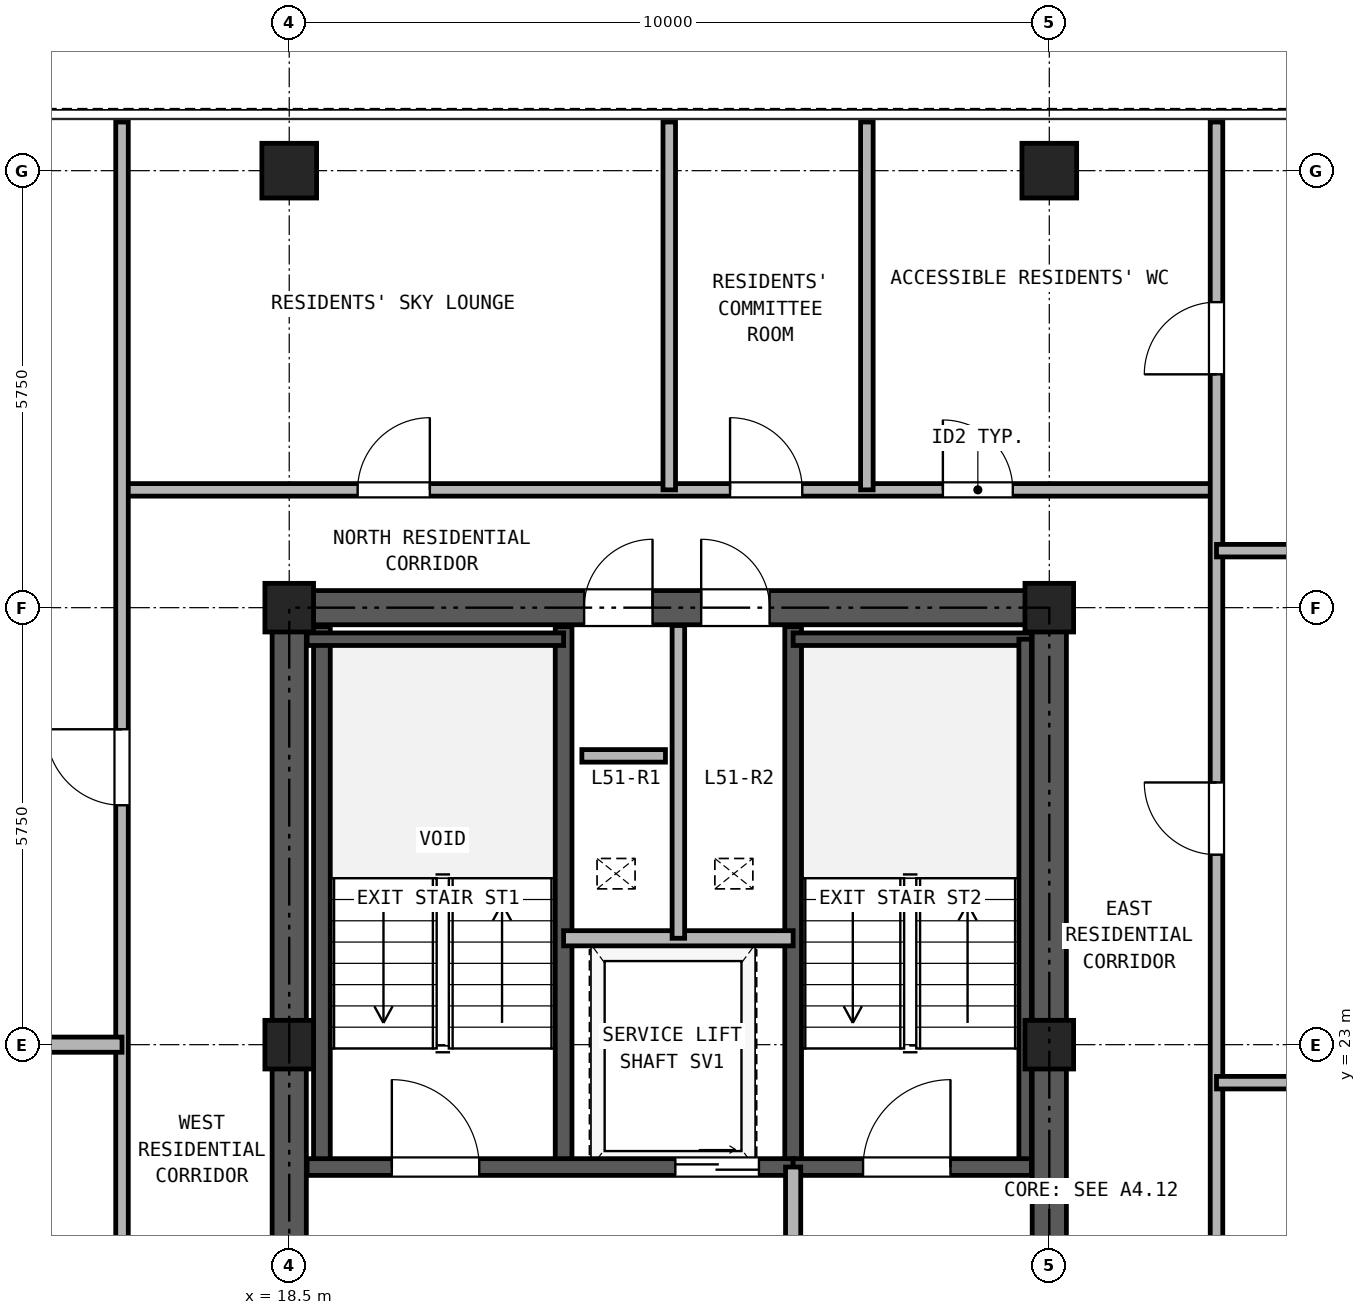
"""IFC4 building model, lengths in metres.
Left out: names, types, materials, properties, quantities, classifications, styles, units other than length and angle.
Written with IfcOpenShell. Run it as: python <this file> out.ifc"""

import sys

from ifc_helpers import new_model, si_unit, direction, frame, frame_2d, origin, origin_2d, place, context, subcontext, project, spatial, rectangle, hollow_rectangle, extrude, source, transform, mapped, element, fill, save


model = new_model("IFC4")
c1 = context("Model", 3, precision=1e-05, world=origin(), true_north=direction((0.0, 1.0)))
c2 = subcontext(c1, "Body", "Model", "MODEL_VIEW")
j1 = project(units=[si_unit("LENGTHUNIT", "METRE"), si_unit("PLANEANGLEUNIT", "RADIAN")], contexts=[c1])
p1 = place(None, origin())
s1 = spatial("IfcSite", under=j1, at=p1, CompositionType="ELEMENT")
p2 = place(p1, origin())
s2 = spatial("IfcBuilding", under=s1, at=p2, CompositionType="ELEMENT")
p3 = place(p2, frame((0.0, 0.0, 181.7)))
s3 = spatial("IfcBuildingStorey", under=s2, at=p3, CompositionType="ELEMENT", Elevation=181.7)
m1 = source(origin(), c2, "Body", "SweptSolid", [
    extrude(hollow_rectangle(XDim=0.72, YDim=0.72, WallThickness=0.04, at=origin_2d()), origin(), (0.0, 0.0, 1.0), 2.95),
])
for number, where, z_axis, x_axis in (
    (1, (18.5, 34.5, 0.0), (0.0, 0.0, 1.0), (1.0, 0.0, 0.0)),
    (2, (28.5, 34.5, 0.0), (0.0, 0.0, 1.0), (1.0, 0.0, 0.0)),
):
    element("IfcColumn", number, at=place(p3, frame(where, z_axis=z_axis, x_axis=x_axis)), inside=s3, PredefinedType="COLUMN", context=c2, shape_type="MappedRepresentation", body=[
        mapped(m1, transform((0.0, 0.0, 0.0), x_axis=(1.0, 0.0, 0.0), y_axis=(0.0, 1.0, 0.0), z_axis=(0.0, 0.0, 1.0), scale=1.0)),
    ])
m2 = source(origin(), c2, "Body", "SweptSolid", [
    extrude(hollow_rectangle(XDim=0.64, YDim=0.64, WallThickness=0.035, at=origin_2d()), origin(), (0.0, 0.0, 1.0), 2.95),
])
for number, where, z_axis, x_axis in (
    (3, (18.5, 23.0, 0.0), (0.0, 0.0, 1.0), (1.0, 0.0, 0.0)),
    (4, (18.5, 28.75, 0.0), (0.0, 0.0, 1.0), (1.0, 0.0, 0.0)),
    (5, (28.5, 23.0, 0.0), (0.0, 0.0, 1.0), (1.0, 0.0, 0.0)),
    (6, (28.5, 28.75, 0.0), (0.0, 0.0, 1.0), (1.0, 0.0, 0.0)),
):
    element("IfcColumn", number, at=place(p3, frame(where, z_axis=z_axis, x_axis=x_axis)), inside=s3, PredefinedType="COLUMN", context=c2, shape_type="MappedRepresentation", body=[
        mapped(m2, transform((0.0, 0.0, 0.0), x_axis=(1.0, 0.0, 0.0), y_axis=(0.0, 1.0, 0.0), z_axis=(0.0, 0.0, 1.0), scale=1.0)),
    ])
p4 = place(p3, frame((18.275, 28.75, 0.0), z_axis=(0.0, 0.0, 1.0), x_axis=(1.0, 0.0, 0.0)))
e7 = element("IfcWall", 7, at=p4, inside=s3, PredefinedType="SHEAR", context=c2, shape_type="SweptSolid", body=[
    extrude(rectangle(XDim=10.45, YDim=0.45, at=frame_2d((5.225, 0.0))), origin(), (0.0, 0.0, 1.0), 2.95),
])
p5 = place(p4, frame((4.105, 0.0, 0.0)))
e8 = element("IfcOpeningElement", 8, at=p5, cuts=e7, PredefinedType="OPENING", context=c2, shape_type="SweptSolid", body=[
    extrude(rectangle(XDim=0.9, YDim=2.05, at=frame_2d((0.45, 1.025))), frame((0.0, 0.235, 0.0), z_axis=(0.0, -1.0, 0.0), x_axis=(1.0, 0.0, 0.0)), (0.0, 0.0, 1.0), 0.47),
])
p6 = place(p4, frame((5.645, 0.0, 0.0)))
e9 = element("IfcOpeningElement", 9, at=p6, cuts=e7, PredefinedType="OPENING", context=c2, shape_type="SweptSolid", body=[
    extrude(rectangle(XDim=0.9, YDim=2.05, at=frame_2d((0.45, 1.025))), frame((0.0, 0.235, 0.0), z_axis=(0.0, -1.0, 0.0), x_axis=(1.0, 0.0, 0.0)), (0.0, 0.0, 1.0), 0.47),
])
p7 = place(p3, frame((18.5, 11.725, 0.0), z_axis=(0.0, 0.0, 1.0), x_axis=(0.0, 1.0, 0.0)))
e10 = element("IfcWall", 10, at=p7, inside=s3, PredefinedType="SHEAR", context=c2, shape_type="SweptSolid", body=[
    extrude(rectangle(XDim=16.8, YDim=0.45, at=frame_2d((8.4, 0.0))), origin(), (0.0, 0.0, 1.0), 2.95),
])
p8 = place(p7, frame((7.425, 0.0, 0.0)))
e11 = element("IfcOpeningElement", 11, at=p8, cuts=e10, PredefinedType="OPENING", context=c2, shape_type="SweptSolid", body=[
    extrude(rectangle(XDim=1.15, YDim=2.2, at=frame_2d((0.575, 1.1))), frame((0.0, 0.235, 0.0), z_axis=(0.0, -1.0, 0.0), x_axis=(1.0, 0.0, 0.0)), (0.0, 0.0, 1.0), 0.47),
])
p9 = place(p3, frame((28.5, 11.725, 0.0), z_axis=(0.0, 0.0, 1.0), x_axis=(0.0, 1.0, 0.0)))
e12 = element("IfcWall", 12, at=p9, inside=s3, PredefinedType="SHEAR", context=c2, shape_type="SweptSolid", body=[
    extrude(rectangle(XDim=16.8, YDim=0.45, at=frame_2d((8.4, 0.0))), origin(), (0.0, 0.0, 1.0), 2.95),
])
p10 = place(p9, frame((7.425, 0.0, 0.0)))
e13 = element("IfcOpeningElement", 13, at=p10, cuts=e12, PredefinedType="OPENING", context=c2, shape_type="SweptSolid", body=[
    extrude(rectangle(XDim=1.15, YDim=2.2, at=frame_2d((0.575, 1.1))), frame((0.0, 0.235, 0.0), z_axis=(0.0, -1.0, 0.0), x_axis=(1.0, 0.0, 0.0)), (0.0, 0.0, 1.0), 0.47),
])
for number, where, z_axis, x_axis in (
    (14, (18.93, 21.39, 0.0), (0.0, 0.0, 1.0), (0.0, 1.0, 0.0)),
    (15, (22.11, 21.39, 0.0), (0.0, 0.0, 1.0), (0.0, 1.0, 0.0)),
    (16, (25.13, 21.39, 0.0), (0.0, 0.0, 1.0), (0.0, 1.0, 0.0)),
):
    element("IfcWall", number, at=place(p3, frame(where, z_axis=z_axis, x_axis=x_axis)), inside=s3, PredefinedType="SOLIDWALL", context=c2, shape_type="SweptSolid", body=[
        extrude(rectangle(XDim=7.11, YDim=0.22, at=frame_2d((3.555, 0.0))), origin(), (0.0, 0.0, 1.0), 2.95),
    ])
p11 = place(p3, frame((18.735, 28.335, 0.0), z_axis=(0.0, 0.0, 1.0), x_axis=(1.0, 0.0, 0.0)))
e17 = element("IfcWall", 17, at=p11, inside=s3, PredefinedType="PARTITIONING", context=c2, shape_type="SweptSolid", body=[
    extrude(rectangle(XDim=3.375, YDim=0.165, at=frame_2d((1.688, 0.0))), origin(), (0.0, 0.0, 1.0), 2.95),
])
p12 = place(p3, frame((25.13, 28.335, 0.0), z_axis=(0.0, 0.0, 1.0), x_axis=(1.0, 0.0, 0.0)))
e18 = element("IfcWall", 18, at=p12, inside=s3, PredefinedType="PARTITIONING", context=c2, shape_type="SweptSolid", body=[
    extrude(rectangle(XDim=3.135, YDim=0.165, at=frame_2d((1.567, 0.0))), origin(), (0.0, 0.0, 1.0), 2.95),
])
p13 = place(p3, frame((28.183, 21.39, 0.0), z_axis=(0.0, 0.0, 1.0), x_axis=(0.0, 1.0, 0.0)))
e19 = element("IfcWall", 19, at=p13, inside=s3, PredefinedType="PARTITIONING", context=c2, shape_type="SweptSolid", body=[
    extrude(rectangle(XDim=6.945, YDim=0.165, at=frame_2d((3.473, 0.0))), origin(), (0.0, 0.0, 1.0), 2.95),
])
p14 = place(p3, frame((18.735, 21.39, 0.0), z_axis=(0.0, 0.0, 1.0), x_axis=(1.0, 0.0, 0.0)))
e20 = element("IfcWall", 20, at=p14, inside=s3, PredefinedType="SOLIDWALL", context=c2, shape_type="SweptSolid", body=[
    extrude(rectangle(XDim=6.395, YDim=0.22, at=frame_2d((3.197, 0.0))), origin(), (0.0, 0.0, 1.0), 2.95),
])
p15 = place(p14, frame((1.115, 0.0, 0.0)))
e21 = element("IfcOpeningElement", 21, at=p15, cuts=e20, PredefinedType="OPENING", context=c2, shape_type="SweptSolid", body=[
    extrude(rectangle(XDim=1.15, YDim=2.2, at=frame_2d((0.575, 1.1))), frame((0.0, 0.12, 0.0), z_axis=(0.0, -1.0, 0.0), x_axis=(1.0, 0.0, 0.0)), (0.0, 0.0, 1.0), 0.24),
])
p16 = place(p14, frame((4.845, 0.0, 0.0)))
e22 = element("IfcOpeningElement", 22, at=p16, cuts=e20, PredefinedType="OPENING", context=c2, shape_type="SweptSolid", body=[
    extrude(rectangle(XDim=1.1, YDim=2.25, at=frame_2d((0.55, 1.125))), frame((0.0, 0.12, 0.0), z_axis=(0.0, -1.0, 0.0), x_axis=(1.0, 0.0, 0.0)), (0.0, 0.0, 1.0), 0.24),
])
p17 = place(p3, frame((25.13, 21.39, 0.0), z_axis=(0.0, 0.0, 1.0), x_axis=(1.0, 0.0, 0.0)))
e23 = element("IfcWall", 23, at=p17, inside=s3, PredefinedType="SOLIDWALL", context=c2, shape_type="SweptSolid", body=[
    extrude(rectangle(XDim=3.135, YDim=0.22, at=frame_2d((1.567, 0.0))), origin(), (0.0, 0.0, 1.0), 2.95),
])
p18 = place(p17, frame((0.92, 0.0, 0.0)))
e24 = element("IfcOpeningElement", 24, at=p18, cuts=e23, PredefinedType="OPENING", context=c2, shape_type="SweptSolid", body=[
    extrude(rectangle(XDim=1.15, YDim=2.2, at=frame_2d((0.575, 1.1))), frame((0.0, 0.12, 0.0), z_axis=(0.0, -1.0, 0.0), x_axis=(1.0, 0.0, 0.0)), (0.0, 0.0, 1.0), 0.24),
])
p19 = place(p3, frame((22.11, 24.4, 0.0), z_axis=(0.0, 0.0, 1.0), x_axis=(1.0, 0.0, 0.0)))
e25 = element("IfcWall", 25, at=p19, inside=s3, PredefinedType="PARTITIONING", context=c2, shape_type="SweptSolid", body=[
    extrude(rectangle(XDim=3.02, YDim=0.2, at=frame_2d((1.51, 0.0))), origin(), (0.0, 0.0, 1.0), 2.95),
])
p20 = place(p3, frame((23.62, 24.4, 0.0), z_axis=(0.0, 0.0, 1.0), x_axis=(0.0, 1.0, 0.0)))
e26 = element("IfcWall", 26, at=p20, inside=s3, PredefinedType="PARTITIONING", context=c2, shape_type="SweptSolid", body=[
    extrude(rectangle(XDim=4.115, YDim=0.165, at=frame_2d((2.058, 0.0))), origin(), (0.0, 0.0, 1.0), 2.95),
])
p21 = place(p3, frame((25.13, 18.0, 0.0), z_axis=(0.0, 0.0, 1.0), x_axis=(0.0, 1.0, 0.0)))
e27 = element("IfcWall", 27, at=p21, inside=s3, PredefinedType="PARTITIONING", context=c2, shape_type="SweptSolid", body=[
    extrude(rectangle(XDim=3.39, YDim=0.2, at=frame_2d((1.695, 0.0))), origin(), (0.0, 0.0, 1.0), 2.95),
])
p22 = place(p21, frame((1.1, 0.0, 0.0)))
e28 = element("IfcOpeningElement", 28, at=p22, cuts=e27, PredefinedType="OPENING", context=c2, shape_type="SweptSolid", body=[
    extrude(rectangle(XDim=1.15, YDim=2.2, at=frame_2d((0.575, 1.1))), frame((0.0, 0.11, 0.0), z_axis=(0.0, -1.0, 0.0), x_axis=(1.0, 0.0, 0.0)), (0.0, 0.0, 1.0), 0.22),
])
p23 = place(p3, frame((16.3, 30.3, 0.0), z_axis=(0.0, 0.0, 1.0), x_axis=(1.0, 0.0, 0.0)))
e29 = element("IfcWall", 29, at=p23, inside=s3, PredefinedType="PARTITIONING", context=c2, shape_type="SweptSolid", body=[
    extrude(rectangle(XDim=14.4, YDim=0.165, at=frame_2d((7.2, 0.0))), origin(), (0.0, 0.0, 1.0), 2.95),
])
p24 = place(p23, frame((3.1, 0.0, 0.0)))
e30 = element("IfcOpeningElement", 30, at=p24, cuts=e29, PredefinedType="OPENING", context=c2, shape_type="SweptSolid", body=[
    extrude(rectangle(XDim=0.95, YDim=2.15, at=frame_2d((0.475, 1.075))), frame((0.0, 0.093, 0.0), z_axis=(0.0, -1.0, 0.0), x_axis=(1.0, 0.0, 0.0)), (0.0, 0.0, 1.0), 0.185),
])
p25 = place(p23, frame((8.0, 0.0, 0.0)))
e31 = element("IfcOpeningElement", 31, at=p25, cuts=e29, PredefinedType="OPENING", context=c2, shape_type="SweptSolid", body=[
    extrude(rectangle(XDim=0.95, YDim=2.15, at=frame_2d((0.475, 1.075))), frame((0.0, 0.093, 0.0), z_axis=(0.0, -1.0, 0.0), x_axis=(1.0, 0.0, 0.0)), (0.0, 0.0, 1.0), 0.185),
])
p26 = place(p23, frame((10.8, 0.0, 0.0)))
e32 = element("IfcOpeningElement", 32, at=p26, cuts=e29, PredefinedType="OPENING", context=c2, shape_type="SweptSolid", body=[
    extrude(rectangle(XDim=0.92, YDim=2.1, at=frame_2d((0.46, 1.05))), frame((0.0, 0.093, 0.0), z_axis=(0.0, -1.0, 0.0), x_axis=(1.0, 0.0, 0.0)), (0.0, 0.0, 1.0), 0.185),
])
p27 = place(p3, frame((16.3, 11.2, 0.0), z_axis=(0.0, 0.0, 1.0), x_axis=(0.0, 1.0, 0.0)))
e33 = element("IfcWall", 33, at=p27, inside=s3, PredefinedType="PARTITIONING", context=c2, shape_type="SweptSolid", body=[
    extrude(rectangle(XDim=23.94, YDim=0.165, at=frame_2d((11.97, 0.0))), origin(), (0.0, 0.0, 1.0), 2.95),
])
p28 = place(p27, frame((5.4, 0.0, 0.0)))
e34 = element("IfcOpeningElement", 34, at=p28, cuts=e33, PredefinedType="OPENING", context=c2, shape_type="SweptSolid", body=[
    extrude(rectangle(XDim=1.0, YDim=2.15, at=frame_2d((0.5, 1.075))), frame((0.0, 0.093, 0.0), z_axis=(0.0, -1.0, 0.0), x_axis=(1.0, 0.0, 0.0)), (0.0, 0.0, 1.0), 0.185),
])
p29 = place(p27, frame((14.95, 0.0, 0.0)))
e35 = element("IfcOpeningElement", 35, at=p29, cuts=e33, PredefinedType="OPENING", context=c2, shape_type="SweptSolid", body=[
    extrude(rectangle(XDim=1.0, YDim=2.15, at=frame_2d((0.5, 1.075))), frame((0.0, 0.093, 0.0), z_axis=(0.0, -1.0, 0.0), x_axis=(1.0, 0.0, 0.0)), (0.0, 0.0, 1.0), 0.185),
])
p30 = place(p3, frame((30.7, 11.2, 0.0), z_axis=(0.0, 0.0, 1.0), x_axis=(0.0, 1.0, 0.0)))
e36 = element("IfcWall", 36, at=p30, inside=s3, PredefinedType="PARTITIONING", context=c2, shape_type="SweptSolid", body=[
    extrude(rectangle(XDim=23.94, YDim=0.165, at=frame_2d((11.97, 0.0))), origin(), (0.0, 0.0, 1.0), 2.95),
])
p31 = place(p30, frame((5.15, 0.0, 0.0)))
e37 = element("IfcOpeningElement", 37, at=p31, cuts=e36, PredefinedType="OPENING", context=c2, shape_type="SweptSolid", body=[
    extrude(rectangle(XDim=0.95, YDim=2.15, at=frame_2d((0.475, 1.075))), frame((0.0, 0.093, 0.0), z_axis=(0.0, -1.0, 0.0), x_axis=(1.0, 0.0, 0.0)), (0.0, 0.0, 1.0), 0.185),
])
p32 = place(p30, frame((14.3, 0.0, 0.0)))
e38 = element("IfcOpeningElement", 38, at=p32, cuts=e36, PredefinedType="OPENING", context=c2, shape_type="SweptSolid", body=[
    extrude(rectangle(XDim=0.95, YDim=2.15, at=frame_2d((0.475, 1.075))), frame((0.0, 0.093, 0.0), z_axis=(0.0, -1.0, 0.0), x_axis=(1.0, 0.0, 0.0)), (0.0, 0.0, 1.0), 0.185),
])
p33 = place(p30, frame((20.62, 0.0, 0.0)))
e39 = element("IfcOpeningElement", 39, at=p33, cuts=e36, PredefinedType="OPENING", context=c2, shape_type="SweptSolid", body=[
    extrude(rectangle(XDim=0.95, YDim=2.15, at=frame_2d((0.475, 1.075))), frame((0.0, 0.093, 0.0), z_axis=(0.0, -1.0, 0.0), x_axis=(1.0, 0.0, 0.0)), (0.0, 0.0, 1.0), 0.185),
])
p34 = place(p3, frame((0.16, 23.0, 0.0), z_axis=(0.0, 0.0, 1.0), x_axis=(1.0, 0.0, 0.0)))
e40 = element("IfcWall", 40, at=p34, inside=s3, PredefinedType="PARTITIONING", context=c2, shape_type="SweptSolid", body=[
    extrude(rectangle(XDim=16.14, YDim=0.2, at=frame_2d((8.07, 0.0))), origin(), (0.0, 0.0, 1.0), 2.323),
])
for number, where, z_axis, x_axis in (
    (41, (30.7, 22.5, 0.0), (0.0, 0.0, 1.0), (1.0, 0.0, 0.0)),
    (42, (30.7, 29.5, 0.0), (0.0, 0.0, 1.0), (1.0, 0.0, 0.0)),
):
    element("IfcWall", number, at=place(p3, frame(where, z_axis=z_axis, x_axis=x_axis)), inside=s3, PredefinedType="PARTITIONING", context=c2, shape_type="SweptSolid", body=[
        extrude(rectangle(XDim=10.94, YDim=0.165, at=frame_2d((5.47, 0.0))), origin(), (0.0, 0.0, 1.0), 2.95),
    ])
for number, where, z_axis, x_axis in (
    (43, (23.5, 30.3, 0.0), (0.0, 0.0, 1.0), (0.0, 1.0, 0.0)),
    (44, (26.1, 30.3, 0.0), (0.0, 0.0, 1.0), (0.0, 1.0, 0.0)),
):
    element("IfcWall", number, at=place(p3, frame(where, z_axis=z_axis, x_axis=x_axis)), inside=s3, PredefinedType="PARTITIONING", context=c2, shape_type="SweptSolid", body=[
        extrude(rectangle(XDim=4.84, YDim=0.165, at=frame_2d((2.42, 0.0))), origin(), (0.0, 0.0, 1.0), 2.95),
    ])
p35 = place(p3, frame((22.35, 26.8, 0.0), z_axis=(0.0, 0.0, 1.0), x_axis=(1.0, 0.0, 0.0)))
e45 = element("IfcWall", 45, at=p35, inside=s3, PredefinedType="PARTITIONING", context=c2, shape_type="SweptSolid", body=[
    extrude(rectangle(XDim=1.1, YDim=0.165, at=frame_2d((0.55, 0.0))), origin(), (0.0, 0.0, 1.0), 2.95),
])
p36 = place(p15, frame((1.15, 0.0, 0.0), z_axis=(0.0, 0.0, 1.0), x_axis=(-1.0, 0.0, 0.0)))
e46 = element("IfcDoor", 46, at=p36, inside=s3, OperationType="SINGLE_SWING_LEFT", PredefinedType="DOOR", context=c2, shape_type="SweptSolid", body=[
    extrude(rectangle(XDim=1.15, YDim=2.2, at=frame_2d((0.575, 1.1))), frame((0.0, 0.025, 0.0), z_axis=(0.0, -1.0, 0.0), x_axis=(1.0, 0.0, 0.0)), (0.0, 0.0, 1.0), 0.05),
])
fill(e21, e46)
p37 = place(p18, frame((1.15, 0.0, 0.0), z_axis=(0.0, 0.0, 1.0), x_axis=(-1.0, 0.0, 0.0)))
e47 = element("IfcDoor", 47, at=p37, inside=s3, OperationType="SINGLE_SWING_RIGHT", PredefinedType="DOOR", context=c2, shape_type="SweptSolid", body=[
    extrude(rectangle(XDim=1.15, YDim=2.2, at=frame_2d((0.575, 1.1))), frame((0.0, 0.025, 0.0), z_axis=(0.0, -1.0, 0.0), x_axis=(1.0, 0.0, 0.0)), (0.0, 0.0, 1.0), 0.05),
])
fill(e24, e47)
p38 = place(p16, frame((1.1, 0.0, 0.0), z_axis=(0.0, 0.0, 1.0), x_axis=(-1.0, 0.0, 0.0)))
e48 = element("IfcDoor", 48, at=p38, inside=s3, OperationType="DOUBLE_DOOR_SLIDING", PredefinedType="DOOR", context=c2, shape_type="SweptSolid", body=[
    extrude(rectangle(XDim=1.1, YDim=2.25, at=frame_2d((0.55, 1.125))), frame((0.0, 0.025, 0.0), z_axis=(0.0, -1.0, 0.0), x_axis=(1.0, 0.0, 0.0)), (0.0, 0.0, 1.0), 0.05),
])
fill(e22, e48)
p39 = place(p5, origin())
e49 = element("IfcDoor", 49, at=p39, inside=s3, OperationType="SINGLE_SWING_RIGHT", PredefinedType="DOOR", context=c2, shape_type="SweptSolid", body=[
    extrude(rectangle(XDim=0.9, YDim=2.05, at=frame_2d((0.45, 1.025))), frame((0.0, 0.025, 0.0), z_axis=(0.0, -1.0, 0.0), x_axis=(1.0, 0.0, 0.0)), (0.0, 0.0, 1.0), 0.05),
])
fill(e8, e49)
p40 = place(p6, origin())
e50 = element("IfcDoor", 50, at=p40, inside=s3, OperationType="SINGLE_SWING_LEFT", PredefinedType="DOOR", context=c2, shape_type="SweptSolid", body=[
    extrude(rectangle(XDim=0.9, YDim=2.05, at=frame_2d((0.45, 1.025))), frame((0.0, 0.025, 0.0), z_axis=(0.0, -1.0, 0.0), x_axis=(1.0, 0.0, 0.0)), (0.0, 0.0, 1.0), 0.05),
])
fill(e9, e50)
p41 = place(p29, origin())
e51 = element("IfcDoor", 51, at=p41, inside=s3, OperationType="SINGLE_SWING_RIGHT", PredefinedType="DOOR", context=c2, shape_type="SweptSolid", body=[
    extrude(rectangle(XDim=1.0, YDim=2.15, at=frame_2d((0.5, 1.075))), frame((0.0, 0.025, 0.0), z_axis=(0.0, -1.0, 0.0), x_axis=(1.0, 0.0, 0.0)), (0.0, 0.0, 1.0), 0.05),
])
fill(e35, e51)
p42 = place(p32, origin())
e52 = element("IfcDoor", 52, at=p42, inside=s3, OperationType="SINGLE_SWING_RIGHT", PredefinedType="DOOR", context=c2, shape_type="SweptSolid", body=[
    extrude(rectangle(XDim=0.95, YDim=2.15, at=frame_2d((0.475, 1.075))), frame((0.0, 0.025, 0.0), z_axis=(0.0, -1.0, 0.0), x_axis=(1.0, 0.0, 0.0)), (0.0, 0.0, 1.0), 0.05),
])
fill(e38, e52)
p43 = place(p33, origin())
e53 = element("IfcDoor", 53, at=p43, inside=s3, OperationType="SINGLE_SWING_LEFT", PredefinedType="DOOR", context=c2, shape_type="SweptSolid", body=[
    extrude(rectangle(XDim=0.95, YDim=2.15, at=frame_2d((0.475, 1.075))), frame((0.0, 0.025, 0.0), z_axis=(0.0, -1.0, 0.0), x_axis=(1.0, 0.0, 0.0)), (0.0, 0.0, 1.0), 0.05),
])
fill(e39, e53)
p44 = place(p24, origin())
e54 = element("IfcDoor", 54, at=p44, inside=s3, OperationType="SINGLE_SWING_RIGHT", PredefinedType="DOOR", context=c2, shape_type="SweptSolid", body=[
    extrude(rectangle(XDim=0.95, YDim=2.15, at=frame_2d((0.475, 1.075))), frame((0.0, 0.025, 0.0), z_axis=(0.0, -1.0, 0.0), x_axis=(1.0, 0.0, 0.0)), (0.0, 0.0, 1.0), 0.05),
])
fill(e30, e54)
p45 = place(p25, origin())
e55 = element("IfcDoor", 55, at=p45, inside=s3, OperationType="SINGLE_SWING_LEFT", PredefinedType="DOOR", context=c2, shape_type="SweptSolid", body=[
    extrude(rectangle(XDim=0.95, YDim=2.15, at=frame_2d((0.475, 1.075))), frame((0.0, 0.025, 0.0), z_axis=(0.0, -1.0, 0.0), x_axis=(1.0, 0.0, 0.0)), (0.0, 0.0, 1.0), 0.05),
])
fill(e31, e55)
p46 = place(p26, origin())
e56 = element("IfcDoor", 56, at=p46, inside=s3, OperationType="SINGLE_SWING_LEFT", PredefinedType="DOOR", context=c2, shape_type="SweptSolid", body=[
    extrude(rectangle(XDim=0.92, YDim=2.1, at=frame_2d((0.46, 1.05))), frame((0.0, 0.025, 0.0), z_axis=(0.0, -1.0, 0.0), x_axis=(1.0, 0.0, 0.0)), (0.0, 0.0, 1.0), 0.05),
])
fill(e32, e56)
save(model, sys.argv[1])
